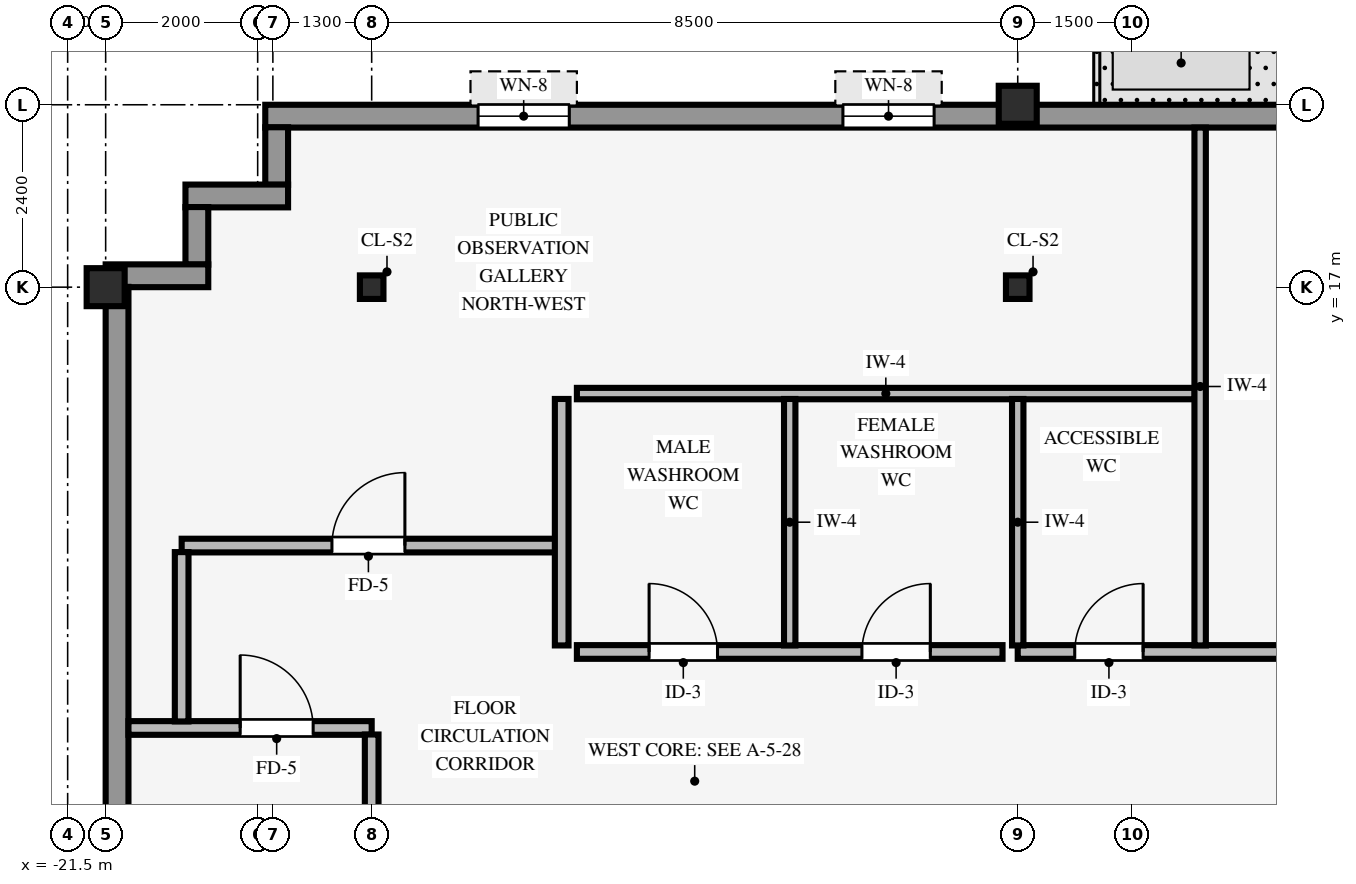
"""IFC4 building model, lengths in metres.
Left out: names, types, materials, properties, quantities, classifications, styles, units other than length and angle.
Written with IfcOpenShell. Run it as: python <this file> out.ifc"""

import sys

from ifc_helpers import new_model, si_unit, direction, frame, frame_2d, origin, origin_2d, place, context, subcontext, project, spatial, rectangle, hollow_rectangle, i_section, extrude, source, transform, mapped, element, fill, save


model = new_model("IFC4")
c1 = context("Model", 3, precision=1e-05, world=origin(), true_north=direction((0.0, 1.0)))
c2 = subcontext(c1, "Body", "Model", "MODEL_VIEW")
j1 = project(units=[si_unit("LENGTHUNIT", "METRE"), si_unit("PLANEANGLEUNIT", "RADIAN")], contexts=[c1])
p1 = place(None, origin())
s1 = spatial("IfcSite", under=j1, at=p1, CompositionType="ELEMENT")
p2 = place(p1, origin())
s2 = spatial("IfcBuilding", under=s1, at=p2, CompositionType="ELEMENT")
p3 = place(p2, frame((0.0, 0.0, 283.5)))
s3 = spatial("IfcBuildingStorey", under=s2, at=p3, CompositionType="ELEMENT", Elevation=283.5)
for number, where, z_axis, x_axis in (
    (1, (-21.0, 17.0, 0.0), (0.0, 0.0, 1.0), (1.0, 0.0, 0.0)),
    (2, (-9.0, 19.4, 0.0), (0.0, 0.0, 1.0), (1.0, 0.0, 0.0)),
):
    element("IfcColumn", number, at=place(p3, frame(where, z_axis=z_axis, x_axis=x_axis)), inside=s3, PredefinedType="COLUMN", context=c2, shape_type="SweptSolid", body=[
        extrude(hollow_rectangle(XDim=0.5, YDim=0.5, WallThickness=0.032, InnerFilletRadius=0.032, OuterFilletRadius=0.064, at=origin_2d()), origin(), (0.0, 0.0, 1.0), 3.25),
    ])
for number, where, z_axis, x_axis in (
    (3, (-17.5, 17.0, 0.0), (0.0, 0.0, 1.0), (1.0, 0.0, 0.0)),
    (4, (-9.0, 17.0, 0.0), (0.0, 0.0, 1.0), (1.0, 0.0, 0.0)),
):
    element("IfcColumn", number, at=place(p3, frame(where, z_axis=z_axis, x_axis=x_axis)), inside=s3, PredefinedType="COLUMN", context=c2, shape_type="SweptSolid", body=[
        extrude(i_section(OverallWidth=0.31, OverallDepth=0.31, WebThickness=0.015, FlangeThickness=0.015, FilletRadius=0.015, at=origin_2d()), origin(), (0.0, 0.0, 1.0), 3.25),
    ])
p4 = place(p3, frame((-18.9, 19.25, 0.0), z_axis=(0.0, 0.0, 1.0), x_axis=(1.0, 0.0, 0.0)))
e5 = element("IfcWall", 5, at=p4, inside=s3, PredefinedType="STANDARD", context=c2, shape_type="SweptSolid", body=[
    extrude(rectangle(XDim=35.6, YDim=0.3, at=frame_2d((17.8, 0.0))), origin(), (0.0, 0.0, 1.0), 3.24),
])
p5 = place(p4, frame((13.5, 0.0, 0.0)))
e6 = element("IfcOpeningElement", 6, at=p5, cuts=e5, PredefinedType="OPENING", context=c2, shape_type="SweptSolid", body=[
    extrude(rectangle(XDim=1.05, YDim=2.1, at=frame_2d((0.525, 1.05))), frame((0.0, 0.16, 0.0), z_axis=(0.0, -1.0, 0.0), x_axis=(1.0, 0.0, 0.0)), (0.0, 0.0, 1.0), 0.32),
])
p6 = place(p4, frame((2.8, 0.0, 0.8)))
e7 = element("IfcOpeningElement", 7, at=p6, cuts=e5, PredefinedType="OPENING", context=c2, shape_type="SweptSolid", body=[
    extrude(rectangle(XDim=1.2, YDim=1.48, at=frame_2d((0.6, 0.74))), frame((0.0, 0.16, 0.0), z_axis=(0.0, -1.0, 0.0), x_axis=(1.0, 0.0, 0.0)), (0.0, 0.0, 1.0), 0.32),
])
p7 = place(p4, frame((7.6, 0.0, 0.8)))
e8 = element("IfcOpeningElement", 8, at=p7, cuts=e5, PredefinedType="OPENING", context=c2, shape_type="SweptSolid", body=[
    extrude(rectangle(XDim=1.2, YDim=1.48, at=frame_2d((0.6, 0.74))), frame((0.0, 0.16, 0.0), z_axis=(0.0, -1.0, 0.0), x_axis=(1.0, 0.0, 0.0)), (0.0, 0.0, 1.0), 0.32),
])
p8 = place(p4, frame((16.75, 0.0, 0.8)))
e9 = element("IfcOpeningElement", 9, at=p8, cuts=e5, PredefinedType="OPENING", context=c2, shape_type="SweptSolid", body=[
    extrude(rectangle(XDim=1.2, YDim=1.48, at=frame_2d((0.6, 0.74))), frame((0.0, 0.16, 0.0), z_axis=(0.0, -1.0, 0.0), x_axis=(1.0, 0.0, 0.0)), (0.0, 0.0, 1.0), 0.32),
])
p9 = place(p4, frame((22.0, 0.0, 0.8)))
e10 = element("IfcOpeningElement", 10, at=p9, cuts=e5, PredefinedType="OPENING", context=c2, shape_type="SweptSolid", body=[
    extrude(rectangle(XDim=1.2, YDim=1.48, at=frame_2d((0.6, 0.74))), frame((0.0, 0.16, 0.0), z_axis=(0.0, -1.0, 0.0), x_axis=(1.0, 0.0, 0.0)), (0.0, 0.0, 1.0), 0.32),
])
p10 = place(p4, frame((25.9, 0.0, 0.8)))
e11 = element("IfcOpeningElement", 11, at=p10, cuts=e5, PredefinedType="OPENING", context=c2, shape_type="SweptSolid", body=[
    extrude(rectangle(XDim=1.2, YDim=1.48, at=frame_2d((0.6, 0.74))), frame((0.0, 0.16, 0.0), z_axis=(0.0, -1.0, 0.0), x_axis=(1.0, 0.0, 0.0)), (0.0, 0.0, 1.0), 0.32),
])
p11 = place(p4, frame((31.6, 0.0, 0.8)))
e12 = element("IfcOpeningElement", 12, at=p11, cuts=e5, PredefinedType="OPENING", context=c2, shape_type="SweptSolid", body=[
    extrude(rectangle(XDim=1.2, YDim=1.48, at=frame_2d((0.6, 0.74))), frame((0.0, 0.16, 0.0), z_axis=(0.0, -1.0, 0.0), x_axis=(1.0, 0.0, 0.0)), (0.0, 0.0, 1.0), 0.32),
])
p12 = place(p3, frame((-18.75, 18.346, 0.0), z_axis=(0.0, 0.0, 1.0), x_axis=(0.0, 1.0, 0.0)))
e13 = element("IfcWall", 13, at=p12, inside=s3, PredefinedType="STANDARD", context=c2, shape_type="SweptSolid", body=[
    extrude(rectangle(XDim=0.758, YDim=0.3, at=frame_2d((0.379, 0.0))), origin(), (0.0, 0.0, 1.0), 3.24),
])
p13 = place(p3, frame((-19.95, 18.2, 0.0), z_axis=(0.0, 0.0, 1.0), x_axis=(1.0, 0.0, 0.0)))
e14 = element("IfcWall", 14, at=p13, inside=s3, PredefinedType="STANDARD", context=c2, shape_type="SweptSolid", body=[
    extrude(rectangle(XDim=1.35, YDim=0.3, at=frame_2d((0.675, 0.0))), origin(), (0.0, 0.0, 1.0), 3.24),
])
p14 = place(p3, frame((-19.8, 17.296, 0.0), z_axis=(0.0, 0.0, 1.0), x_axis=(0.0, 1.0, 0.0)))
e15 = element("IfcWall", 15, at=p14, inside=s3, PredefinedType="STANDARD", context=c2, shape_type="SweptSolid", body=[
    extrude(rectangle(XDim=0.758, YDim=0.3, at=frame_2d((0.379, 0.0))), origin(), (0.0, 0.0, 1.0), 3.24),
])
p15 = place(p3, frame((-21.0, 17.15, 0.0), z_axis=(0.0, 0.0, 1.0), x_axis=(1.0, 0.0, 0.0)))
e16 = element("IfcWall", 16, at=p15, inside=s3, PredefinedType="STANDARD", context=c2, shape_type="SweptSolid", body=[
    extrude(rectangle(XDim=1.35, YDim=0.3, at=frame_2d((0.675, 0.0))), origin(), (0.0, 0.0, 1.0), 3.24),
])
p16 = place(p3, frame((-20.85, 3.6, 0.0), z_axis=(0.0, 0.0, 1.0), x_axis=(0.0, 1.0, 0.0)))
e17 = element("IfcWall", 17, at=p16, inside=s3, PredefinedType="STANDARD", context=c2, shape_type="SweptSolid", body=[
    extrude(rectangle(XDim=13.404, YDim=0.3, at=frame_2d((6.702, 0.0))), origin(), (0.0, 0.0, 1.0), 3.24),
])
p17 = place(p16, frame((2.551, 0.0, 0.8)))
e18 = element("IfcOpeningElement", 18, at=p17, cuts=e17, PredefinedType="OPENING", context=c2, shape_type="SweptSolid", body=[
    extrude(rectangle(XDim=2.6, YDim=1.9, at=frame_2d((1.3, 0.95))), frame((0.0, 0.16, 0.0), z_axis=(0.0, -1.0, 0.0), x_axis=(1.0, 0.0, 0.0)), (0.0, 0.0, 1.0), 0.32),
])
p18 = place(p3, frame((-20.7, 11.2, 0.0), z_axis=(0.0, 0.0, 1.0), x_axis=(1.0, 0.0, 0.0)))
e19 = element("IfcWall", 19, at=p18, inside=s3, PredefinedType="PARTITIONING", context=c2, shape_type="SweptSolid", body=[
    extrude(rectangle(XDim=3.2, YDim=0.18, at=frame_2d((1.6, 0.0))), origin(), (0.0, 0.0, 1.0), 3.24),
])
p19 = place(p18, frame((1.47, 0.0, 0.0)))
e20 = element("IfcOpeningElement", 20, at=p19, cuts=e19, PredefinedType="OPENING", context=c2, shape_type="SweptSolid", body=[
    extrude(rectangle(XDim=0.96, YDim=2.1, at=frame_2d((0.48, 1.05))), frame((0.0, 0.1, 0.0), z_axis=(0.0, -1.0, 0.0), x_axis=(1.0, 0.0, 0.0)), (0.0, 0.0, 1.0), 0.2),
])
p20 = place(p3, frame((-14.8, 12.2, 0.0), z_axis=(0.0, 0.0, 1.0), x_axis=(1.0, 0.0, 0.0)))
e21 = element("IfcWall", 21, at=p20, inside=s3, PredefinedType="PARTITIONING", context=c2, shape_type="SweptSolid", body=[
    extrude(rectangle(XDim=5.6, YDim=0.18, at=frame_2d((2.8, 0.0))), origin(), (0.0, 0.0, 1.0), 3.24),
])
p21 = place(p20, frame((0.95, 0.0, 0.0)))
e22 = element("IfcOpeningElement", 22, at=p21, cuts=e21, PredefinedType="OPENING", context=c2, shape_type="SweptSolid", body=[
    extrude(rectangle(XDim=0.9, YDim=2.1, at=frame_2d((0.45, 1.05))), frame((0.0, 0.1, 0.0), z_axis=(0.0, -1.0, 0.0), x_axis=(1.0, 0.0, 0.0)), (0.0, 0.0, 1.0), 0.2),
])
p22 = place(p20, frame((3.75, 0.0, 0.0)))
e23 = element("IfcOpeningElement", 23, at=p22, cuts=e21, PredefinedType="OPENING", context=c2, shape_type="SweptSolid", body=[
    extrude(rectangle(XDim=0.9, YDim=2.1, at=frame_2d((0.45, 1.05))), frame((0.0, 0.1, 0.0), z_axis=(0.0, -1.0, 0.0), x_axis=(1.0, 0.0, 0.0)), (0.0, 0.0, 1.0), 0.2),
])
p23 = place(p3, frame((-9.0, 12.2, 0.0), z_axis=(0.0, 0.0, 1.0), x_axis=(1.0, 0.0, 0.0)))
e24 = element("IfcWall", 24, at=p23, inside=s3, PredefinedType="PARTITIONING", context=c2, shape_type="SweptSolid", body=[
    extrude(rectangle(XDim=24.8, YDim=0.18, at=frame_2d((12.4, 0.0))), origin(), (0.0, 0.0, 1.0), 3.24),
])
p24 = place(p23, frame((8.52, 0.0, 0.0)))
e25 = element("IfcOpeningElement", 25, at=p24, cuts=e24, PredefinedType="OPENING", context=c2, shape_type="SweptSolid", body=[
    extrude(rectangle(XDim=0.96, YDim=2.1, at=frame_2d((0.48, 1.05))), frame((0.0, 0.1, 0.0), z_axis=(0.0, -1.0, 0.0), x_axis=(1.0, 0.0, 0.0)), (0.0, 0.0, 1.0), 0.2),
])
p25 = place(p23, frame((20.92, 0.0, 0.0)))
e26 = element("IfcOpeningElement", 26, at=p25, cuts=e24, PredefinedType="OPENING", context=c2, shape_type="SweptSolid", body=[
    extrude(rectangle(XDim=0.96, YDim=2.1, at=frame_2d((0.48, 1.05))), frame((0.0, 0.1, 0.0), z_axis=(0.0, -1.0, 0.0), x_axis=(1.0, 0.0, 0.0)), (0.0, 0.0, 1.0), 0.2),
])
p26 = place(p23, frame((0.75, 0.0, 0.0)))
e27 = element("IfcOpeningElement", 27, at=p26, cuts=e24, PredefinedType="OPENING", context=c2, shape_type="SweptSolid", body=[
    extrude(rectangle(XDim=0.9, YDim=2.1, at=frame_2d((0.45, 1.05))), frame((0.0, 0.1, 0.0), z_axis=(0.0, -1.0, 0.0), x_axis=(1.0, 0.0, 0.0)), (0.0, 0.0, 1.0), 0.2),
])
p27 = place(p3, frame((-20.0, 13.6, 0.0), z_axis=(0.0, 0.0, 1.0), x_axis=(1.0, 0.0, 0.0)))
e28 = element("IfcWall", 28, at=p27, inside=s3, PredefinedType="PARTITIONING", context=c2, shape_type="SweptSolid", body=[
    extrude(rectangle(XDim=4.914, YDim=0.18, at=frame_2d((2.457, 0.0))), origin(), (0.0, 0.0, 1.0), 3.24),
])
p28 = place(p27, frame((1.977, 0.0, 0.0)))
e29 = element("IfcOpeningElement", 29, at=p28, cuts=e28, PredefinedType="OPENING", context=c2, shape_type="SweptSolid", body=[
    extrude(rectangle(XDim=0.96, YDim=2.1, at=frame_2d((0.48, 1.05))), frame((0.0, 0.1, 0.0), z_axis=(0.0, -1.0, 0.0), x_axis=(1.0, 0.0, 0.0)), (0.0, 0.0, 1.0), 0.2),
])
p29 = place(p3, frame((-14.8, 15.6, 0.0), z_axis=(0.0, 0.0, 1.0), x_axis=(1.0, 0.0, 0.0)))
e30 = element("IfcWall", 30, at=p29, inside=s3, PredefinedType="PARTITIONING", context=c2, shape_type="SweptSolid", body=[
    extrude(rectangle(XDim=8.129, YDim=0.15, at=frame_2d((4.064, 0.0))), origin(), (0.0, 0.0, 1.0), 3.24),
])
p30 = place(p3, frame((-20.0, 11.286, 0.0), z_axis=(0.0, 0.0, 1.0), x_axis=(0.0, 1.0, 0.0)))
e31 = element("IfcWall", 31, at=p30, inside=s3, PredefinedType="PARTITIONING", context=c2, shape_type="SweptSolid", body=[
    extrude(rectangle(XDim=2.228, YDim=0.18, at=frame_2d((1.114, 0.0))), origin(), (0.0, 0.0, 1.0), 3.24),
])
p31 = place(p3, frame((-17.5, 9.996, 0.0), z_axis=(0.0, 0.0, 1.0), x_axis=(0.0, 1.0, 0.0)))
e32 = element("IfcWall", 32, at=p31, inside=s3, PredefinedType="PARTITIONING", context=c2, shape_type="SweptSolid", body=[
    extrude(rectangle(XDim=1.118, YDim=0.18, at=frame_2d((0.559, 0.0))), origin(), (0.0, 0.0, 1.0), 3.24),
])
p32 = place(p3, frame((-15.0, 12.286, 0.0), z_axis=(0.0, 0.0, 1.0), x_axis=(0.0, 1.0, 0.0)))
e33 = element("IfcWall", 33, at=p32, inside=s3, PredefinedType="PARTITIONING", context=c2, shape_type="SweptSolid", body=[
    extrude(rectangle(XDim=3.243, YDim=0.18, at=frame_2d((1.622, 0.0))), origin(), (0.0, 0.0, 1.0), 3.24),
])
p33 = place(p3, frame((-12.0, 12.286, 0.0), z_axis=(0.0, 0.0, 1.0), x_axis=(0.0, 1.0, 0.0)))
e34 = element("IfcWall", 34, at=p33, inside=s3, PredefinedType="PARTITIONING", context=c2, shape_type="SweptSolid", body=[
    extrude(rectangle(XDim=3.243, YDim=0.15, at=frame_2d((1.622, 0.0))), origin(), (0.0, 0.0, 1.0), 3.24),
])
p34 = place(p3, frame((-9.0, 12.286, 0.0), z_axis=(0.0, 0.0, 1.0), x_axis=(0.0, 1.0, 0.0)))
e35 = element("IfcWall", 35, at=p34, inside=s3, PredefinedType="PARTITIONING", context=c2, shape_type="SweptSolid", body=[
    extrude(rectangle(XDim=3.243, YDim=0.15, at=frame_2d((1.622, 0.0))), origin(), (0.0, 0.0, 1.0), 2.772),
])
p35 = place(p3, frame((-6.6, 12.286, 0.0), z_axis=(0.0, 0.0, 1.0), x_axis=(0.0, 1.0, 0.0)))
e36 = element("IfcWall", 36, at=p35, inside=s3, PredefinedType="PARTITIONING", context=c2, shape_type="SweptSolid", body=[
    extrude(rectangle(XDim=6.814, YDim=0.15, at=frame_2d((3.407, 0.0))), origin(), (0.0, 0.0, 1.0), 3.24),
])
m1 = source(origin(), c2, "Body", "SweptSolid", [
    extrude(rectangle(XDim=1.2, YDim=1.48, at=frame_2d((0.6, 0.74))), frame((0.0, 0.03, 0.0), z_axis=(0.0, -1.0, 0.0), x_axis=(1.0, 0.0, 0.0)), (0.0, 0.0, 1.0), 0.06),
])
p36 = place(p6, origin())
e37 = element("IfcWindow", 37, at=p36, inside=s3, PartitioningType="SINGLE_PANEL", PredefinedType="WINDOW", context=c2, shape_type="MappedRepresentation", body=[
    mapped(m1, transform((0.0, 0.0, 0.0), scale=1.0)),
])
fill(e7, e37)
p37 = place(p7, origin())
e38 = element("IfcWindow", 38, at=p37, inside=s3, PartitioningType="SINGLE_PANEL", PredefinedType="WINDOW", context=c2, shape_type="MappedRepresentation", body=[
    mapped(m1, transform((0.0, 0.0, 0.0), scale=1.0)),
])
fill(e8, e38)
m2 = source(origin(), c2, "Body", "SweptSolid", [
    extrude(rectangle(XDim=0.96, YDim=2.1, at=frame_2d((0.48, 1.05))), frame((0.0, 0.025, 0.0), z_axis=(0.0, -1.0, 0.0), x_axis=(1.0, 0.0, 0.0)), (0.0, 0.0, 1.0), 0.05),
])
p38 = place(p28, origin())
e39 = element("IfcDoor", 39, at=p38, inside=s3, OperationType="SINGLE_SWING_RIGHT", PredefinedType="DOOR", context=c2, shape_type="MappedRepresentation", body=[
    mapped(m2, transform((0.0, 0.0, 0.0), scale=1.0)),
])
fill(e29, e39)
m3 = source(origin(), c2, "Body", "SweptSolid", [
    extrude(rectangle(XDim=0.9, YDim=2.1, at=frame_2d((0.45, 1.05))), frame((0.0, 0.025, 0.0), z_axis=(0.0, -1.0, 0.0), x_axis=(1.0, 0.0, 0.0)), (0.0, 0.0, 1.0), 0.05),
])
p39 = place(p21, origin())
e40 = element("IfcDoor", 40, at=p39, inside=s3, OperationType="SINGLE_SWING_LEFT", PredefinedType="DOOR", context=c2, shape_type="MappedRepresentation", body=[
    mapped(m3, transform((0.0, 0.0, 0.0), scale=1.0)),
])
fill(e22, e40)
p40 = place(p22, origin())
e41 = element("IfcDoor", 41, at=p40, inside=s3, OperationType="SINGLE_SWING_RIGHT", PredefinedType="DOOR", context=c2, shape_type="MappedRepresentation", body=[
    mapped(m3, transform((0.0, 0.0, 0.0), scale=1.0)),
])
fill(e23, e41)
p41 = place(p19, origin())
e42 = element("IfcDoor", 42, at=p41, inside=s3, OperationType="SINGLE_SWING_LEFT", PredefinedType="DOOR", context=c2, shape_type="MappedRepresentation", body=[
    mapped(m2, transform((0.0, 0.0, 0.0), scale=1.0)),
])
fill(e20, e42)
p42 = place(p26, origin())
e43 = element("IfcDoor", 43, at=p42, inside=s3, OperationType="SINGLE_SWING_RIGHT", PredefinedType="DOOR", context=c2, shape_type="MappedRepresentation", body=[
    mapped(m3, transform((0.0, 0.0, 0.0), scale=1.0)),
])
fill(e27, e43)
save(model, sys.argv[1])
